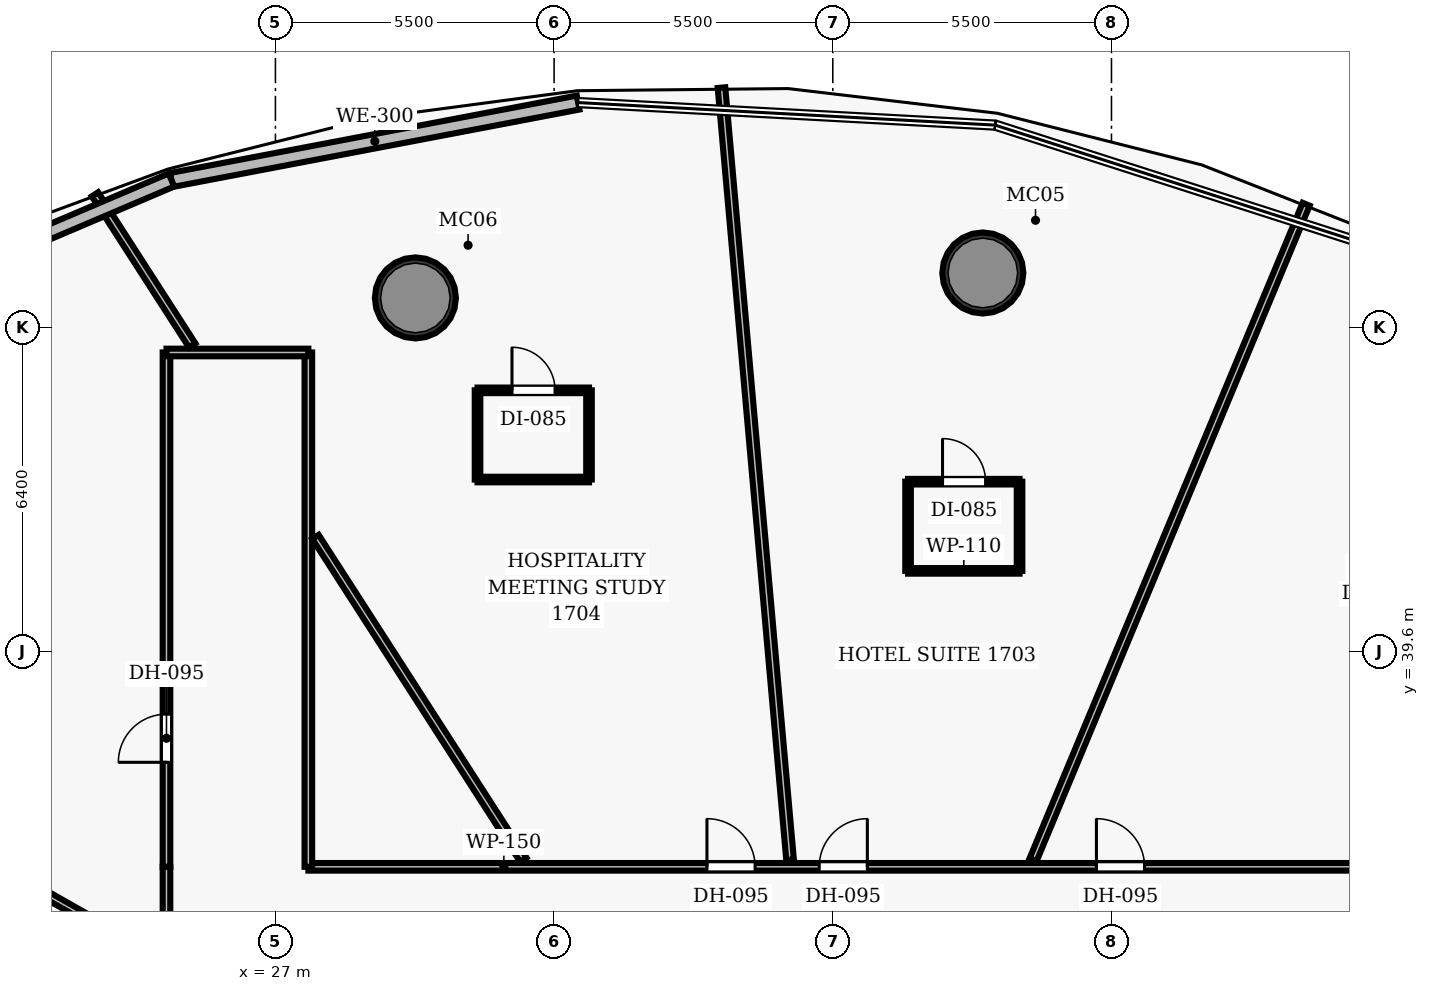
"""IFC4 building model, lengths in metres.
Left out: names, types, materials, properties, quantities, classifications, styles, units other than length and angle.
Written with IfcOpenShell. Run it as: python <this file> out.ifc"""

import sys

from ifc_helpers import new_model, si_unit, direction, frame, frame_2d, origin, origin_2d, place, context, subcontext, project, spatial, rectangle, hollow_circle, extrude, element, fill, save


model = new_model("IFC4")
c1 = context("Model", 3, precision=1e-05, world=origin(), true_north=direction((0.0, 1.0)))
c2 = subcontext(c1, "Body", "Model", "MODEL_VIEW")
j1 = project(units=[si_unit("LENGTHUNIT", "METRE"), si_unit("PLANEANGLEUNIT", "RADIAN")], contexts=[c1])
p1 = place(None, origin())
s1 = spatial("IfcSite", under=j1, at=p1, CompositionType="ELEMENT")
p2 = place(p1, origin())
s2 = spatial("IfcBuilding", under=s1, at=p2, CompositionType="ELEMENT")
p3 = place(p2, frame((0.0, 0.0, 76.4)))
s3 = spatial("IfcBuildingStorey", under=s2, at=p3, CompositionType="ELEMENT", Elevation=76.4)
for number, where, z_axis, x_axis in (
    (1, (40.961, 47.069, 0.0), (0.0, 0.0, 1.0), (1.0, 0.0, 0.0)),
    (2, (29.762, 46.577, 0.0), (0.0, 0.0, 1.0), (1.0, 0.0, 0.0)),
):
    element("IfcColumn", number, at=place(p3, frame(where, z_axis=z_axis, x_axis=x_axis)), inside=s3, PredefinedType="COLUMN", context=c2, shape_type="SweptSolid", body=[
        extrude(hollow_circle(Radius=0.8, WallThickness=0.06, at=origin_2d()), origin(), (0.0, 0.0, 1.0), 3.5),
    ])
p4 = place(p3, frame((27.65, 35.35, 0.0), z_axis=(0.0, 0.0, 1.0), x_axis=(1.0, 0.0, 0.0)))
e3 = element("IfcWall", 3, at=p4, inside=s3, PredefinedType="PARTITIONING", context=c2, shape_type="SweptSolid", body=[
    extrude(rectangle(XDim=23.5, YDim=0.15, at=frame_2d((11.75, 0.0))), origin(), (0.0, 0.0, 1.0), 2.6),
])
p5 = place(p4, frame((15.553, 0.0, 0.0)))
e4 = element("IfcOpeningElement", 4, at=p5, cuts=e3, PredefinedType="OPENING", context=c2, shape_type="SweptSolid", body=[
    extrude(rectangle(XDim=0.95, YDim=2.15, at=frame_2d((0.475, 1.075))), frame((0.0, 0.085, 0.0), z_axis=(0.0, -1.0, 0.0), x_axis=(1.0, 0.0, 0.0)), (0.0, 0.0, 1.0), 0.17),
])
p6 = place(p4, frame((10.082, 0.0, 0.0)))
e5 = element("IfcOpeningElement", 5, at=p6, cuts=e3, PredefinedType="OPENING", context=c2, shape_type="SweptSolid", body=[
    extrude(rectangle(XDim=0.95, YDim=2.15, at=frame_2d((0.475, 1.075))), frame((0.0, 0.085, 0.0), z_axis=(0.0, -1.0, 0.0), x_axis=(1.0, 0.0, 0.0)), (0.0, 0.0, 1.0), 0.17),
])
p7 = place(p4, frame((7.866, 0.0, 0.0)))
e6 = element("IfcOpeningElement", 6, at=p7, cuts=e3, PredefinedType="OPENING", context=c2, shape_type="SweptSolid", body=[
    extrude(rectangle(XDim=0.95, YDim=2.15, at=frame_2d((0.475, 1.075))), frame((0.0, 0.085, 0.0), z_axis=(0.0, -1.0, 0.0), x_axis=(1.0, 0.0, 0.0)), (0.0, 0.0, 1.0), 0.17),
])
p8 = place(p3, frame((24.85, 19.45, 0.0), z_axis=(0.0, 0.0, 1.0), x_axis=(0.0, 1.0, 0.0)))
e7 = element("IfcWall", 7, at=p8, inside=s3, PredefinedType="PARTITIONING", context=c2, shape_type="SweptSolid", body=[
    extrude(rectangle(XDim=15.9, YDim=0.15, at=frame_2d((7.95, 0.0))), origin(), (0.0, 0.0, 1.0), 2.6),
])
p9 = place(p8, frame((8.128, 0.0, 0.0)))
e8 = element("IfcOpeningElement", 8, at=p9, cuts=e7, PredefinedType="OPENING", context=c2, shape_type="SweptSolid", body=[
    extrude(rectangle(XDim=0.95, YDim=2.15, at=frame_2d((0.475, 1.075))), frame((0.0, 0.085, 0.0), z_axis=(0.0, -1.0, 0.0), x_axis=(1.0, 0.0, 0.0)), (0.0, 0.0, 1.0), 0.17),
])
p10 = place(p8, frame((4.98, 0.0, 0.0)))
e9 = element("IfcOpeningElement", 9, at=p10, cuts=e7, PredefinedType="OPENING", context=c2, shape_type="SweptSolid", body=[
    extrude(rectangle(XDim=0.95, YDim=2.15, at=frame_2d((0.475, 1.075))), frame((0.0, 0.085, 0.0), z_axis=(0.0, -1.0, 0.0), x_axis=(1.0, 0.0, 0.0)), (0.0, 0.0, 1.0), 0.17),
])
p11 = place(p3, frame((24.85, 35.35, 0.0), z_axis=(0.0, 0.0, 1.0), x_axis=(0.0, 1.0, 0.0)))
e10 = element("IfcWall", 10, at=p11, inside=s3, PredefinedType="PARTITIONING", context=c2, shape_type="SweptSolid", body=[
    extrude(rectangle(XDim=10.15, YDim=0.15, at=frame_2d((5.075, 0.0))), origin(), (0.0, 0.0, 1.0), 2.6),
])
p12 = place(p11, frame((2.062, 0.0, 0.0)))
e11 = element("IfcOpeningElement", 11, at=p12, cuts=e10, PredefinedType="OPENING", context=c2, shape_type="SweptSolid", body=[
    extrude(rectangle(XDim=0.95, YDim=2.15, at=frame_2d((0.475, 1.075))), frame((0.0, 0.085, 0.0), z_axis=(0.0, -1.0, 0.0), x_axis=(1.0, 0.0, 0.0)), (0.0, 0.0, 1.0), 0.17),
])
p13 = place(p3, frame((27.65, 35.35, 0.0), z_axis=(0.0, 0.0, 1.0), x_axis=(0.0, 1.0, 0.0)))
e12 = element("IfcWall", 12, at=p13, inside=s3, PredefinedType="PARTITIONING", context=c2, shape_type="SweptSolid", body=[
    extrude(rectangle(XDim=10.15, YDim=0.15, at=frame_2d((5.075, 0.0))), origin(), (0.0, 0.0, 1.0), 2.6),
])
p14 = place(p3, frame((24.85, 45.5, 0.0), z_axis=(0.0, 0.0, 1.0), x_axis=(1.0, 0.0, 0.0)))
e13 = element("IfcWall", 13, at=p14, inside=s3, PredefinedType="PARTITIONING", context=c2, shape_type="SweptSolid", body=[
    extrude(rectangle(XDim=2.8, YDim=0.15, at=frame_2d((1.4, 0.0))), origin(), (0.0, 0.0, 1.0), 2.6),
])
p15 = place(p3, frame((41.953, 35.49, 0.0), z_axis=(0.0, 0.0, 1.0), x_axis=(0.384537444803, 0.923109394137, 0.0)))
e14 = element("IfcWall", 14, at=p15, inside=s3, PredefinedType="PARTITIONING", context=c2, shape_type="SweptSolid", body=[
    extrude(rectangle(XDim=14.013, YDim=0.15, at=frame_2d((7.006, 0.0))), origin(), (0.0, 0.0, 1.0), 2.6),
])
p16 = place(p3, frame((37.157, 35.49, 0.0), z_axis=(0.0, 0.0, 1.0), x_axis=(-0.088499322769, 0.996076236977, 0.0)))
e15 = element("IfcWall", 15, at=p16, inside=s3, PredefinedType="PARTITIONING", context=c2, shape_type="SweptSolid", body=[
    extrude(rectangle(XDim=15.297, YDim=0.15, at=frame_2d((7.648, 0.0))), origin(), (0.0, 0.0, 1.0), 2.6),
])
p17 = place(p3, frame((31.891, 35.49, 0.0), z_axis=(0.0, 0.0, 1.0), x_axis=(-0.541252535473, 0.840860091123, 0.0)))
e16 = element("IfcWall", 16, at=p17, inside=s3, PredefinedType="PARTITIONING", context=c2, shape_type="SweptSolid", body=[
    extrude(rectangle(XDim=7.577, YDim=0.15, at=frame_2d((3.789, 0.0))), origin(), (0.0, 0.0, 1.0), 2.6),
])
p18 = place(p3, frame((25.358, 45.64, 0.0), z_axis=(0.0, 0.0, 1.0), x_axis=(-0.541265574581, 0.840851697848, 0.0)))
e17 = element("IfcWall", 17, at=p18, inside=s3, PredefinedType="PARTITIONING", context=c2, shape_type="SweptSolid", body=[
    extrude(rectangle(XDim=3.546, YDim=0.15, at=frame_2d((1.773, 0.0))), origin(), (0.0, 0.0, 1.0), 2.6),
])
p19 = place(p3, frame((24.71, 33.531, 0.0), z_axis=(0.0, 0.0, 1.0), x_axis=(-0.870027523458, 0.493003152551, 0.0)))
e18 = element("IfcWall", 18, at=p19, inside=s3, PredefinedType="PARTITIONING", context=c2, shape_type="SweptSolid", body=[
    extrude(rectangle(XDim=15.695, YDim=0.15, at=frame_2d((7.848, 0.0))), origin(), (0.0, 0.0, 1.0), 2.6),
])
p20 = place(p3, frame((39.486, 41.19, 0.0), z_axis=(0.0, 0.0, 1.0), x_axis=(1.0, 0.0, 0.0)))
e19 = element("IfcWall", 19, at=p20, inside=s3, PredefinedType="PARTITIONING", context=c2, shape_type="SweptSolid", body=[
    extrude(rectangle(XDim=2.2, YDim=0.11, at=frame_2d((1.1, 0.0))), origin(), (0.0, 0.0, 1.0), 2.6),
])
p21 = place(p3, frame((39.486, 42.95, 0.0), z_axis=(0.0, 0.0, 1.0), x_axis=(1.0, 0.0, 0.0)))
e20 = element("IfcWall", 20, at=p21, inside=s3, PredefinedType="PARTITIONING", context=c2, shape_type="SweptSolid", body=[
    extrude(rectangle(XDim=2.2, YDim=0.11, at=frame_2d((1.1, 0.0))), origin(), (0.0, 0.0, 1.0), 2.6),
])
p22 = place(p21, frame((0.68, 0.0, 0.0)))
e21 = element("IfcOpeningElement", 21, at=p22, cuts=e20, PredefinedType="OPENING", context=c2, shape_type="SweptSolid", body=[
    extrude(rectangle(XDim=0.85, YDim=2.1, at=frame_2d((0.425, 1.05))), frame((0.0, 0.065, 0.0), z_axis=(0.0, -1.0, 0.0), x_axis=(1.0, 0.0, 0.0)), (0.0, 0.0, 1.0), 0.13),
])
for number, where, z_axis, x_axis in (
    (22, (39.486, 41.19, 0.0), (0.0, 0.0, 1.0), (0.0, 1.0, 0.0)),
    (23, (41.686, 41.19, 0.0), (0.0, 0.0, 1.0), (0.0, 1.0, 0.0)),
):
    element("IfcWall", number, at=place(p3, frame(where, z_axis=z_axis, x_axis=x_axis)), inside=s3, PredefinedType="PARTITIONING", context=c2, shape_type="SweptSolid", body=[
        extrude(rectangle(XDim=1.76, YDim=0.11, at=frame_2d((0.88, 0.0))), origin(), (0.0, 0.0, 1.0), 2.6),
    ])
p23 = place(p3, frame((30.989, 42.993, 0.0), z_axis=(0.0, 0.0, 1.0), x_axis=(1.0, 0.0, 0.0)))
e24 = element("IfcWall", 24, at=p23, inside=s3, PredefinedType="PARTITIONING", context=c2, shape_type="SweptSolid", body=[
    extrude(rectangle(XDim=2.2, YDim=0.11, at=frame_2d((1.1, 0.0))), origin(), (0.0, 0.0, 1.0), 2.6),
])
p24 = place(p3, frame((30.989, 44.753, 0.0), z_axis=(0.0, 0.0, 1.0), x_axis=(1.0, 0.0, 0.0)))
e25 = element("IfcWall", 25, at=p24, inside=s3, PredefinedType="PARTITIONING", context=c2, shape_type="SweptSolid", body=[
    extrude(rectangle(XDim=2.2, YDim=0.11, at=frame_2d((1.1, 0.0))), origin(), (0.0, 0.0, 1.0), 2.6),
])
p25 = place(p24, frame((0.68, 0.0, 0.0)))
e26 = element("IfcOpeningElement", 26, at=p25, cuts=e25, PredefinedType="OPENING", context=c2, shape_type="SweptSolid", body=[
    extrude(rectangle(XDim=0.85, YDim=2.1, at=frame_2d((0.425, 1.05))), frame((0.0, 0.065, 0.0), z_axis=(0.0, -1.0, 0.0), x_axis=(1.0, 0.0, 0.0)), (0.0, 0.0, 1.0), 0.13),
])
for number, where, z_axis, x_axis in (
    (27, (30.989, 42.993, 0.0), (0.0, 0.0, 1.0), (0.0, 1.0, 0.0)),
    (28, (33.189, 42.993, 0.0), (0.0, 0.0, 1.0), (0.0, 1.0, 0.0)),
):
    element("IfcWall", number, at=place(p3, frame(where, z_axis=z_axis, x_axis=x_axis)), inside=s3, PredefinedType="PARTITIONING", context=c2, shape_type="SweptSolid", body=[
        extrude(rectangle(XDim=1.76, YDim=0.11, at=frame_2d((0.88, 0.0))), origin(), (0.0, 0.0, 1.0), 2.6),
    ])
p26 = place(p3, frame((24.948, 48.904, 0.0), z_axis=(0.0, 0.0, 1.0), x_axis=(0.982368629085, 0.186954209872, 0.0)))
e29 = element("IfcWall", 29, at=p26, inside=s3, PredefinedType="SOLIDWALL", context=c2, shape_type="SweptSolid", body=[
    extrude(rectangle(XDim=8.171, YDim=0.28, at=frame_2d((4.085, 0.0))), origin(), (0.0, 0.0, 1.0), 3.25),
])
p27 = place(p3, frame((17.73, 45.831, 0.0), z_axis=(0.0, 0.0, 1.0), x_axis=(0.92004247014, 0.391818648279, 0.0)))
e30 = element("IfcWall", 30, at=p27, inside=s3, PredefinedType="SOLIDWALL", context=c2, shape_type="SweptSolid", body=[
    extrude(rectangle(XDim=7.845, YDim=0.28, at=frame_2d((3.922, 0.0))), origin(), (0.0, 0.0, 1.0), 3.25),
])
p28 = place(p5, origin())
e31 = element("IfcDoor", 31, at=p28, inside=s3, OperationType="SINGLE_SWING_LEFT", PredefinedType="DOOR", context=c2, shape_type="SweptSolid", body=[
    extrude(rectangle(XDim=0.95, YDim=2.15, at=frame_2d((0.475, 1.075))), frame((0.0, 0.025, 0.0), z_axis=(0.0, -1.0, 0.0), x_axis=(1.0, 0.0, 0.0)), (0.0, 0.0, 1.0), 0.05),
])
fill(e4, e31)
p29 = place(p6, origin())
e32 = element("IfcDoor", 32, at=p29, inside=s3, OperationType="SINGLE_SWING_RIGHT", PredefinedType="DOOR", context=c2, shape_type="SweptSolid", body=[
    extrude(rectangle(XDim=0.95, YDim=2.15, at=frame_2d((0.475, 1.075))), frame((0.0, 0.025, 0.0), z_axis=(0.0, -1.0, 0.0), x_axis=(1.0, 0.0, 0.0)), (0.0, 0.0, 1.0), 0.05),
])
fill(e5, e32)
p30 = place(p22, origin())
e33 = element("IfcDoor", 33, at=p30, inside=s3, OperationType="SINGLE_SWING_LEFT", PredefinedType="DOOR", context=c2, shape_type="SweptSolid", body=[
    extrude(rectangle(XDim=0.85, YDim=2.1, at=frame_2d((0.425, 1.05))), frame((0.0, 0.025, 0.0), z_axis=(0.0, -1.0, 0.0), x_axis=(1.0, 0.0, 0.0)), (0.0, 0.0, 1.0), 0.05),
])
fill(e21, e33)
p31 = place(p7, origin())
e34 = element("IfcDoor", 34, at=p31, inside=s3, OperationType="SINGLE_SWING_LEFT", PredefinedType="DOOR", context=c2, shape_type="SweptSolid", body=[
    extrude(rectangle(XDim=0.95, YDim=2.15, at=frame_2d((0.475, 1.075))), frame((0.0, 0.025, 0.0), z_axis=(0.0, -1.0, 0.0), x_axis=(1.0, 0.0, 0.0)), (0.0, 0.0, 1.0), 0.05),
])
fill(e6, e34)
p32 = place(p25, origin())
e35 = element("IfcDoor", 35, at=p32, inside=s3, OperationType="SINGLE_SWING_LEFT", PredefinedType="DOOR", context=c2, shape_type="SweptSolid", body=[
    extrude(rectangle(XDim=0.85, YDim=2.1, at=frame_2d((0.425, 1.05))), frame((0.0, 0.025, 0.0), z_axis=(0.0, -1.0, 0.0), x_axis=(1.0, 0.0, 0.0)), (0.0, 0.0, 1.0), 0.05),
])
fill(e26, e35)
p33 = place(p12, origin())
e36 = element("IfcDoor", 36, at=p33, inside=s3, OperationType="SINGLE_SWING_LEFT", PredefinedType="DOOR", context=c2, shape_type="SweptSolid", body=[
    extrude(rectangle(XDim=0.95, YDim=2.15, at=frame_2d((0.475, 1.075))), frame((0.0, 0.025, 0.0), z_axis=(0.0, -1.0, 0.0), x_axis=(1.0, 0.0, 0.0)), (0.0, 0.0, 1.0), 0.05),
])
fill(e11, e36)
save(model, sys.argv[1])
